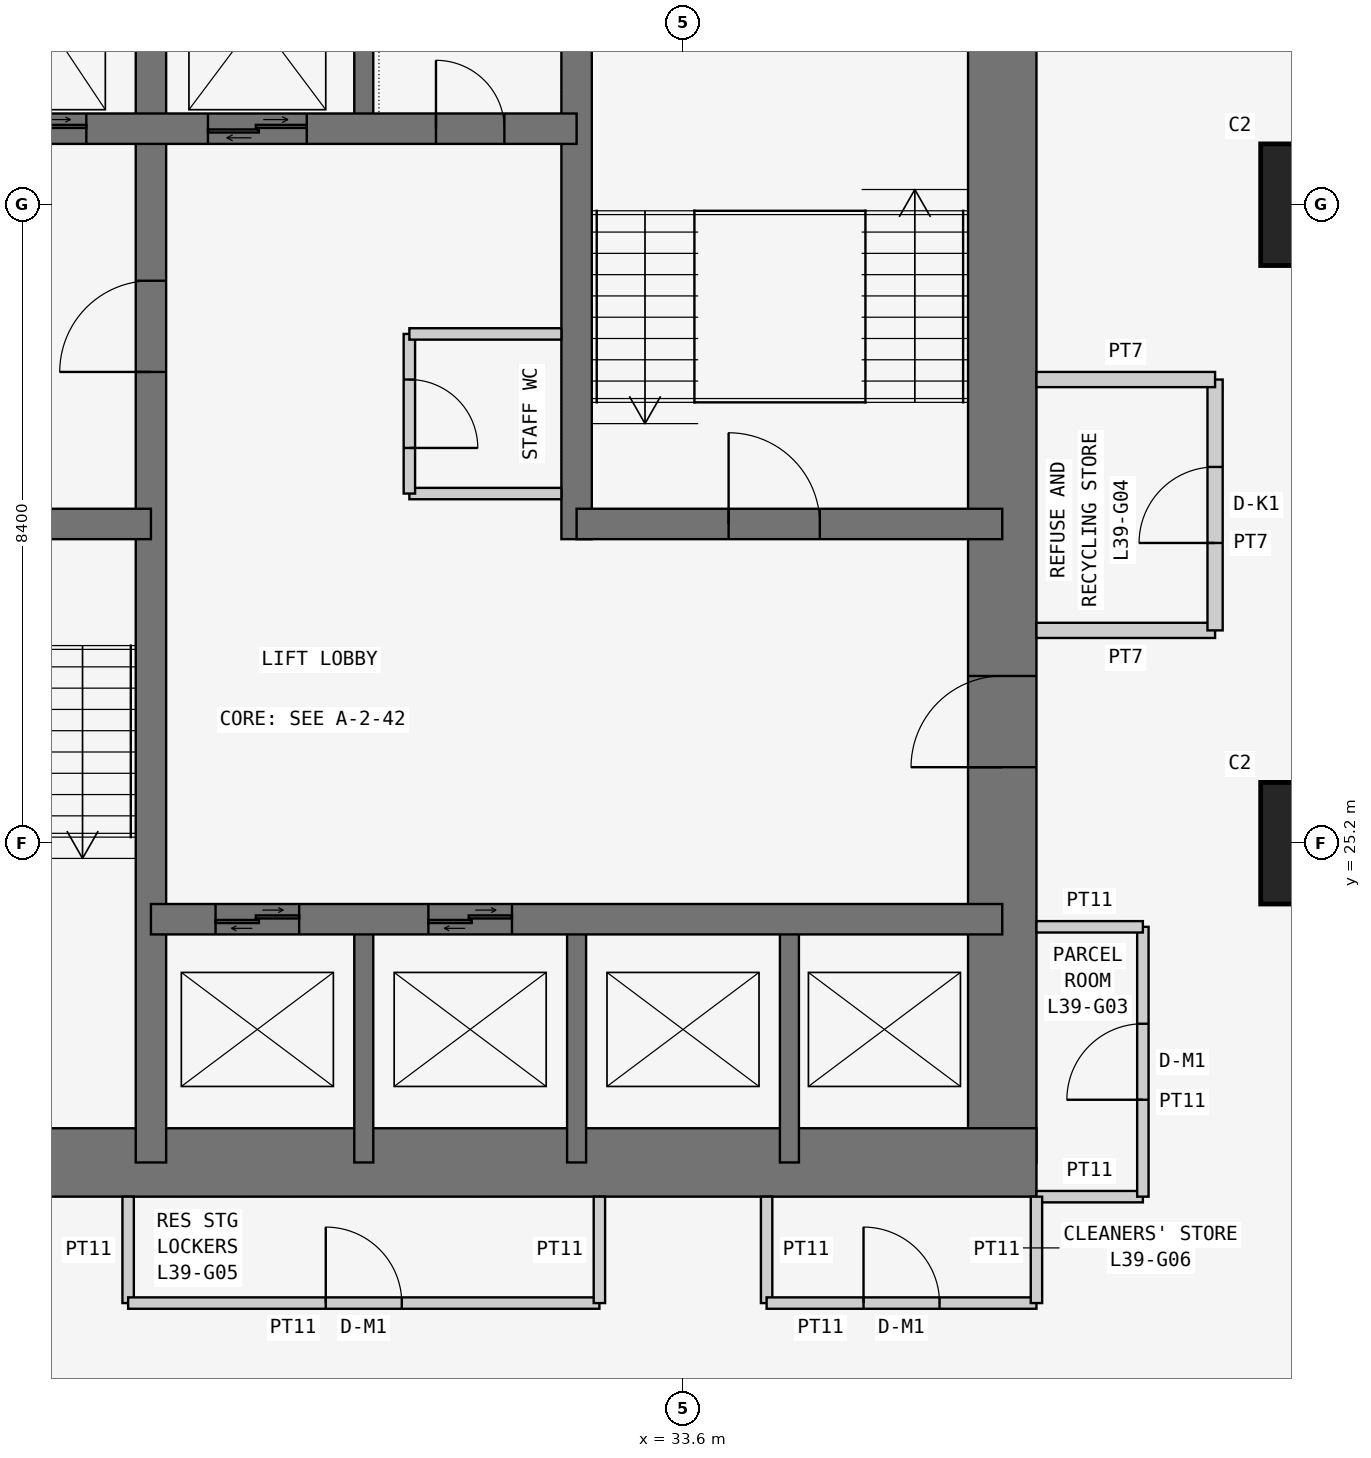
"""IFC4 building model, lengths in metres.
Left out: names, types, materials, properties, quantities, classifications, styles, units other than length and angle.
Written with IfcOpenShell. Run it as: python <this file> out.ifc"""

import sys

from ifc_helpers import new_model, si_unit, direction, frame, frame_2d, origin, origin_2d, place, context, subcontext, project, spatial, rectangle, extrude, element, fill, save


model = new_model("IFC4")
c1 = context("Model", 3, precision=1e-05, world=origin(), true_north=direction((0.0, 1.0)))
c2 = subcontext(c1, "Body", "Model", "MODEL_VIEW")
j1 = project(units=[si_unit("LENGTHUNIT", "METRE"), si_unit("PLANEANGLEUNIT", "RADIAN")], contexts=[c1])
p1 = place(None, origin())
s1 = spatial("IfcSite", under=j1, at=p1, CompositionType="ELEMENT")
p2 = place(p1, origin())
s2 = spatial("IfcBuilding", under=s1, at=p2, CompositionType="ELEMENT")
p3 = place(p2, frame((0.0, 0.0, 152.1)))
s3 = spatial("IfcBuildingStorey", under=s2, at=p3, CompositionType="ELEMENT", Elevation=152.1)
for number, where, z_axis, x_axis in (
    (1, (42.0, 25.2, 0.0), (0.0, 0.0, 1.0), (1.0, 0.0, 0.0)),
    (2, (42.0, 33.6, 0.0), (0.0, 0.0, 1.0), (1.0, 0.0, 0.0)),
):
    element("IfcColumn", number, at=place(p3, frame(where, z_axis=z_axis, x_axis=x_axis)), inside=s3, PredefinedType="COLUMN", context=c2, shape_type="SweptSolid", body=[
        extrude(rectangle(XDim=1.6, YDim=1.6, at=origin_2d()), origin(), (0.0, 0.0, 1.0), 3.6),
    ])
p4 = place(p3, frame((21.0, 21.0, 0.0), z_axis=(0.0, 0.0, 1.0), x_axis=(1.0, 0.0, 0.0)))
e3 = element("IfcWall", 3, at=p4, inside=s3, PredefinedType="SHEAR", context=c2, shape_type="SweptSolid", body=[
    extrude(rectangle(XDim=17.25, YDim=0.9, at=frame_2d((8.625, 0.0))), origin(), (0.0, 0.0, 1.0), 3.6),
])
p5 = place(p3, frame((37.8, 21.0, 0.0), z_axis=(0.0, 0.0, 1.0), x_axis=(0.0, 1.0, 0.0)))
e4 = element("IfcWall", 4, at=p5, inside=s3, PredefinedType="SHEAR", context=c2, shape_type="SweptSolid", body=[
    extrude(rectangle(XDim=17.25, YDim=0.9, at=frame_2d((8.625, 0.0))), origin(), (0.0, 0.0, 1.0), 3.6),
])
p6 = place(p5, frame((5.2, 0.0, 0.0)))
e5 = element("IfcOpeningElement", 5, at=p6, cuts=e4, PredefinedType="OPENING", context=c2, shape_type="SweptSolid", body=[
    extrude(rectangle(XDim=1.2, YDim=2.1, at=frame_2d((0.6, 1.05))), frame((0.0, 0.46, 0.0), z_axis=(0.0, -1.0, 0.0), x_axis=(1.0, 0.0, 0.0)), (0.0, 0.0, 1.0), 0.92),
])
p7 = place(p3, frame((26.6, 21.0, 0.0), z_axis=(0.0, 0.0, 1.0), x_axis=(0.0, 1.0, 0.0)))
e6 = element("IfcWall", 6, at=p7, inside=s3, PredefinedType="SHEAR", context=c2, shape_type="SweptSolid", body=[
    extrude(rectangle(XDim=16.8, YDim=0.4, at=frame_2d((8.4, 0.0))), origin(), (0.0, 0.0, 1.0), 3.6),
])
p8 = place(p7, frame((10.4, 0.0, 0.0)))
e7 = element("IfcOpeningElement", 7, at=p8, cuts=e6, PredefinedType="OPENING", context=c2, shape_type="SweptSolid", body=[
    extrude(rectangle(XDim=1.2, YDim=2.1, at=frame_2d((0.6, 1.05))), frame((0.0, 0.21, 0.0), z_axis=(0.0, -1.0, 0.0), x_axis=(1.0, 0.0, 0.0)), (0.0, 0.0, 1.0), 0.42),
])
p9 = place(p3, frame((21.0, 29.4, 0.0), z_axis=(0.0, 0.0, 1.0), x_axis=(1.0, 0.0, 0.0)))
e8 = element("IfcWall", 8, at=p9, inside=s3, PredefinedType="SHEAR", context=c2, shape_type="SweptSolid", body=[
    extrude(rectangle(XDim=5.6, YDim=0.4, at=frame_2d((2.8, 0.0))), origin(), (0.0, 0.0, 1.0), 3.6),
])
p10 = place(p9, frame((2.3, 0.0, 0.0)))
e9 = element("IfcOpeningElement", 9, at=p10, cuts=e8, PredefinedType="OPENING", context=c2, shape_type="SweptSolid", body=[
    extrude(rectangle(XDim=1.2, YDim=2.1, at=frame_2d((0.6, 1.05))), frame((0.0, 0.21, 0.0), z_axis=(0.0, -1.0, 0.0), x_axis=(1.0, 0.0, 0.0)), (0.0, 0.0, 1.0), 0.42),
])
p11 = place(p3, frame((21.0, 34.6, 0.0), z_axis=(0.0, 0.0, 1.0), x_axis=(1.0, 0.0, 0.0)))
e10 = element("IfcWall", 10, at=p11, inside=s3, PredefinedType="SHEAR", context=c2, shape_type="SweptSolid", body=[
    extrude(rectangle(XDim=11.2, YDim=0.4, at=frame_2d((5.6, 0.0))), origin(), (0.0, 0.0, 1.0), 3.6),
])
p12 = place(p11, frame((9.35, 0.0, 0.0)))
e11 = element("IfcOpeningElement", 11, at=p12, cuts=e10, PredefinedType="OPENING", context=c2, shape_type="SweptSolid", body=[
    extrude(rectangle(XDim=0.9, YDim=2.1, at=frame_2d((0.45, 1.05))), frame((0.0, 0.21, 0.0), z_axis=(0.0, -1.0, 0.0), x_axis=(1.0, 0.0, 0.0)), (0.0, 0.0, 1.0), 0.42),
])
p13 = place(p11, frame((1.0, 0.0, 0.0)))
e12 = element("IfcOpeningElement", 12, at=p13, cuts=e10, PredefinedType="OPENING", context=c2, shape_type="SweptSolid", body=[
    extrude(rectangle(XDim=1.1, YDim=2.1, at=frame_2d((0.55, 1.05))), frame((0.0, 0.21, 0.0), z_axis=(0.0, -1.0, 0.0), x_axis=(1.0, 0.0, 0.0)), (0.0, 0.0, 1.0), 0.42),
])
p14 = place(p11, frame((3.65, 0.0, 0.0)))
e13 = element("IfcOpeningElement", 13, at=p14, cuts=e10, PredefinedType="OPENING", context=c2, shape_type="SweptSolid", body=[
    extrude(rectangle(XDim=1.1, YDim=2.1, at=frame_2d((0.55, 1.05))), frame((0.0, 0.21, 0.0), z_axis=(0.0, -1.0, 0.0), x_axis=(1.0, 0.0, 0.0)), (0.0, 0.0, 1.0), 0.42),
])
p15 = place(p11, frame((6.35, 0.0, 0.0)))
e14 = element("IfcOpeningElement", 14, at=p15, cuts=e10, PredefinedType="OPENING", context=c2, shape_type="SweptSolid", body=[
    extrude(rectangle(XDim=1.3, YDim=2.1, at=frame_2d((0.65, 1.05))), frame((0.0, 0.21, 0.0), z_axis=(0.0, -1.0, 0.0), x_axis=(1.0, 0.0, 0.0)), (0.0, 0.0, 1.0), 0.42),
])
p16 = place(p3, frame((26.6, 24.2, 0.0), z_axis=(0.0, 0.0, 1.0), x_axis=(1.0, 0.0, 0.0)))
e15 = element("IfcWall", 15, at=p16, inside=s3, PredefinedType="SHEAR", context=c2, shape_type="SweptSolid", body=[
    extrude(rectangle(XDim=11.2, YDim=0.4, at=frame_2d((5.6, 0.0))), origin(), (0.0, 0.0, 1.0), 3.6),
])
p17 = place(p16, frame((0.85, 0.0, 0.0)))
e16 = element("IfcOpeningElement", 16, at=p17, cuts=e15, PredefinedType="OPENING", context=c2, shape_type="SweptSolid", body=[
    extrude(rectangle(XDim=1.1, YDim=2.1, at=frame_2d((0.55, 1.05))), frame((0.0, 0.21, 0.0), z_axis=(0.0, -1.0, 0.0), x_axis=(1.0, 0.0, 0.0)), (0.0, 0.0, 1.0), 0.42),
])
p18 = place(p16, frame((3.65, 0.0, 0.0)))
e17 = element("IfcOpeningElement", 17, at=p18, cuts=e15, PredefinedType="OPENING", context=c2, shape_type="SweptSolid", body=[
    extrude(rectangle(XDim=1.1, YDim=2.1, at=frame_2d((0.55, 1.05))), frame((0.0, 0.21, 0.0), z_axis=(0.0, -1.0, 0.0), x_axis=(1.0, 0.0, 0.0)), (0.0, 0.0, 1.0), 0.42),
])
p19 = place(p3, frame((32.2, 29.2, 0.0), z_axis=(0.0, 0.0, 1.0), x_axis=(0.0, 1.0, 0.0)))
e18 = element("IfcWall", 18, at=p19, inside=s3, PredefinedType="SHEAR", context=c2, shape_type="SweptSolid", body=[
    extrude(rectangle(XDim=8.6, YDim=0.4, at=frame_2d((4.3, 0.0))), origin(), (0.0, 0.0, 1.0), 3.6),
])
p20 = place(p3, frame((32.2, 29.4, 0.0), z_axis=(0.0, 0.0, 1.0), x_axis=(1.0, 0.0, 0.0)))
e19 = element("IfcWall", 19, at=p20, inside=s3, PredefinedType="SHEAR", context=c2, shape_type="SweptSolid", body=[
    extrude(rectangle(XDim=5.6, YDim=0.4, at=frame_2d((2.8, 0.0))), origin(), (0.0, 0.0, 1.0), 3.6),
])
p21 = place(p20, frame((2.0, 0.0, 0.0)))
e20 = element("IfcOpeningElement", 20, at=p21, cuts=e19, PredefinedType="OPENING", context=c2, shape_type="SweptSolid", body=[
    extrude(rectangle(XDim=1.2, YDim=2.1, at=frame_2d((0.6, 1.05))), frame((0.0, 0.21, 0.0), z_axis=(0.0, -1.0, 0.0), x_axis=(1.0, 0.0, 0.0)), (0.0, 0.0, 1.0), 0.42),
])
for number, where, z_axis, x_axis in (
    (21, (29.4, 21.0, 0.0), (0.0, 0.0, 1.0), (0.0, 1.0, 0.0)),
    (22, (32.2, 21.0, 0.0), (0.0, 0.0, 1.0), (0.0, 1.0, 0.0)),
    (23, (35.0, 21.0, 0.0), (0.0, 0.0, 1.0), (0.0, 1.0, 0.0)),
    (24, (29.4, 34.6, 0.0), (0.0, 0.0, 1.0), (0.0, 1.0, 0.0)),
):
    element("IfcWall", number, at=place(p3, frame(where, z_axis=z_axis, x_axis=x_axis)), inside=s3, PredefinedType="SHEAR", context=c2, shape_type="SweptSolid", body=[
        extrude(rectangle(XDim=3.2, YDim=0.25, at=frame_2d((1.6, 0.0))), origin(), (0.0, 0.0, 1.0), 3.6),
    ])
p22 = place(p3, frame((38.25, 20.55, 0.0), z_axis=(0.0, 0.0, 1.0), x_axis=(1.0, 0.0, 0.0)))
e25 = element("IfcWall", 25, at=p22, inside=s3, PredefinedType="PARTITIONING", context=c2, shape_type="SweptSolid", body=[
    extrude(rectangle(XDim=1.4, YDim=0.15, at=frame_2d((0.7, 0.0))), origin(), (0.0, 0.0, 1.0), 3.45),
])
p23 = place(p3, frame((39.65, 20.55, 0.0), z_axis=(0.0, 0.0, 1.0), x_axis=(0.0, 1.0, 0.0)))
e26 = element("IfcWall", 26, at=p23, inside=s3, PredefinedType="PARTITIONING", context=c2, shape_type="SweptSolid", body=[
    extrude(rectangle(XDim=3.55, YDim=0.15, at=frame_2d((1.775, 0.0))), origin(), (0.0, 0.0, 1.0), 3.45),
])
p24 = place(p23, frame((1.275, 0.0, 0.0)))
e27 = element("IfcOpeningElement", 27, at=p24, cuts=e26, PredefinedType="OPENING", context=c2, shape_type="SweptSolid", body=[
    extrude(rectangle(XDim=1.0, YDim=2.1, at=frame_2d((0.5, 1.05))), frame((0.0, 0.085, 0.0), z_axis=(0.0, -1.0, 0.0), x_axis=(1.0, 0.0, 0.0)), (0.0, 0.0, 1.0), 0.17),
])
p25 = place(p3, frame((39.65, 24.1, 0.0), z_axis=(0.0, 0.0, 1.0), x_axis=(-1.0, 0.0, 0.0)))
e28 = element("IfcWall", 28, at=p25, inside=s3, PredefinedType="PARTITIONING", context=c2, shape_type="SweptSolid", body=[
    extrude(rectangle(XDim=1.4, YDim=0.15, at=frame_2d((0.7, 0.0))), origin(), (0.0, 0.0, 1.0), 3.45),
])
p26 = place(p3, frame((38.25, 28.0, 0.0), z_axis=(0.0, 0.0, 1.0), x_axis=(1.0, 0.0, 0.0)))
e29 = element("IfcWall", 29, at=p26, inside=s3, PredefinedType="PARTITIONING", context=c2, shape_type="SweptSolid", body=[
    extrude(rectangle(XDim=2.35, YDim=0.2, at=frame_2d((1.175, 0.0))), origin(), (0.0, 0.0, 1.0), 3.45),
])
p27 = place(p3, frame((40.6, 28.0, 0.0), z_axis=(0.0, 0.0, 1.0), x_axis=(0.0, 1.0, 0.0)))
e30 = element("IfcWall", 30, at=p27, inside=s3, PredefinedType="PARTITIONING", context=c2, shape_type="SweptSolid", body=[
    extrude(rectangle(XDim=3.3, YDim=0.2, at=frame_2d((1.65, 0.0))), origin(), (0.0, 0.0, 1.0), 3.45),
])
p28 = place(p27, frame((1.15, 0.0, 0.0)))
e31 = element("IfcOpeningElement", 31, at=p28, cuts=e30, PredefinedType="OPENING", context=c2, shape_type="SweptSolid", body=[
    extrude(rectangle(XDim=1.0, YDim=2.1, at=frame_2d((0.5, 1.05))), frame((0.0, 0.11, 0.0), z_axis=(0.0, -1.0, 0.0), x_axis=(1.0, 0.0, 0.0)), (0.0, 0.0, 1.0), 0.22),
])
p29 = place(p3, frame((40.6, 31.3, 0.0), z_axis=(0.0, 0.0, 1.0), x_axis=(-1.0, 0.0, 0.0)))
e32 = element("IfcWall", 32, at=p29, inside=s3, PredefinedType="PARTITIONING", context=c2, shape_type="SweptSolid", body=[
    extrude(rectangle(XDim=2.35, YDim=0.2, at=frame_2d((1.175, 0.0))), origin(), (0.0, 0.0, 1.0), 3.45),
])
p30 = place(p3, frame((26.3, 20.55, 0.0), z_axis=(0.0, 0.0, 1.0), x_axis=(0.0, -1.0, 0.0)))
e33 = element("IfcWall", 33, at=p30, inside=s3, PredefinedType="PARTITIONING", context=c2, shape_type="SweptSolid", body=[
    extrude(rectangle(XDim=1.4, YDim=0.15, at=frame_2d((0.7, 0.0))), origin(), (0.0, 0.0, 1.0), 3.45),
])
p31 = place(p3, frame((26.3, 19.15, 0.0), z_axis=(0.0, 0.0, 1.0), x_axis=(1.0, 0.0, 0.0)))
e34 = element("IfcWall", 34, at=p31, inside=s3, PredefinedType="PARTITIONING", context=c2, shape_type="SweptSolid", body=[
    extrude(rectangle(XDim=6.2, YDim=0.15, at=frame_2d((3.1, 0.0))), origin(), (0.0, 0.0, 1.0), 3.45),
])
p32 = place(p31, frame((2.6, 0.0, 0.0)))
e35 = element("IfcOpeningElement", 35, at=p32, cuts=e34, PredefinedType="OPENING", context=c2, shape_type="SweptSolid", body=[
    extrude(rectangle(XDim=1.0, YDim=2.1, at=frame_2d((0.5, 1.05))), frame((0.0, 0.085, 0.0), z_axis=(0.0, -1.0, 0.0), x_axis=(1.0, 0.0, 0.0)), (0.0, 0.0, 1.0), 0.17),
])
for number, where, z_axis, x_axis in (
    (36, (32.5, 19.15, 0.0), (0.0, 0.0, 1.0), (0.0, 1.0, 0.0)),
    (37, (34.7, 20.55, 0.0), (0.0, 0.0, 1.0), (0.0, -1.0, 0.0)),
):
    element("IfcWall", number, at=place(p3, frame(where, z_axis=z_axis, x_axis=x_axis)), inside=s3, PredefinedType="PARTITIONING", context=c2, shape_type="SweptSolid", body=[
        extrude(rectangle(XDim=1.4, YDim=0.15, at=frame_2d((0.7, 0.0))), origin(), (0.0, 0.0, 1.0), 3.45),
    ])
p33 = place(p3, frame((34.7, 19.15, 0.0), z_axis=(0.0, 0.0, 1.0), x_axis=(1.0, 0.0, 0.0)))
e38 = element("IfcWall", 38, at=p33, inside=s3, PredefinedType="PARTITIONING", context=c2, shape_type="SweptSolid", body=[
    extrude(rectangle(XDim=3.55, YDim=0.15, at=frame_2d((1.775, 0.0))), origin(), (0.0, 0.0, 1.0), 3.45),
])
p34 = place(p33, frame((1.275, 0.0, 0.0)))
e39 = element("IfcOpeningElement", 39, at=p34, cuts=e38, PredefinedType="OPENING", context=c2, shape_type="SweptSolid", body=[
    extrude(rectangle(XDim=1.0, YDim=2.1, at=frame_2d((0.5, 1.05))), frame((0.0, 0.085, 0.0), z_axis=(0.0, -1.0, 0.0), x_axis=(1.0, 0.0, 0.0)), (0.0, 0.0, 1.0), 0.17),
])
p35 = place(p3, frame((38.25, 19.15, 0.0), z_axis=(0.0, 0.0, 1.0), x_axis=(0.0, 1.0, 0.0)))
e40 = element("IfcWall", 40, at=p35, inside=s3, PredefinedType="PARTITIONING", context=c2, shape_type="SweptSolid", body=[
    extrude(rectangle(XDim=1.4, YDim=0.15, at=frame_2d((0.7, 0.0))), origin(), (0.0, 0.0, 1.0), 3.45),
])
p36 = place(p3, frame((32.0, 29.8, 0.0), z_axis=(0.0, 0.0, 1.0), x_axis=(-1.0, 0.0, 0.0)))
e41 = element("IfcWall", 41, at=p36, inside=s3, PredefinedType="PARTITIONING", context=c2, shape_type="SweptSolid", body=[
    extrude(rectangle(XDim=2.0, YDim=0.15, at=frame_2d((1.0, 0.0))), origin(), (0.0, 0.0, 1.0), 3.45),
])
p37 = place(p3, frame((30.0, 29.8, 0.0), z_axis=(0.0, 0.0, 1.0), x_axis=(0.0, 1.0, 0.0)))
e42 = element("IfcWall", 42, at=p37, inside=s3, PredefinedType="PARTITIONING", context=c2, shape_type="SweptSolid", body=[
    extrude(rectangle(XDim=2.1, YDim=0.15, at=frame_2d((1.05, 0.0))), origin(), (0.0, 0.0, 1.0), 3.45),
])
p38 = place(p37, frame((0.6, 0.0, 0.0)))
e43 = element("IfcOpeningElement", 43, at=p38, cuts=e42, PredefinedType="OPENING", context=c2, shape_type="SweptSolid", body=[
    extrude(rectangle(XDim=0.9, YDim=2.1, at=frame_2d((0.45, 1.05))), frame((0.0, 0.085, 0.0), z_axis=(0.0, -1.0, 0.0), x_axis=(1.0, 0.0, 0.0)), (0.0, 0.0, 1.0), 0.17),
])
p39 = place(p3, frame((30.0, 31.9, 0.0), z_axis=(0.0, 0.0, 1.0), x_axis=(1.0, 0.0, 0.0)))
e44 = element("IfcWall", 44, at=p39, inside=s3, PredefinedType="PARTITIONING", context=c2, shape_type="SweptSolid", body=[
    extrude(rectangle(XDim=2.0, YDim=0.15, at=frame_2d((1.0, 0.0))), origin(), (0.0, 0.0, 1.0), 3.45),
])
p40 = place(p24, origin())
e45 = element("IfcDoor", 45, at=p40, inside=s3, OperationType="SINGLE_SWING_LEFT", PredefinedType="DOOR", context=c2, shape_type="SweptSolid", body=[
    extrude(rectangle(XDim=1.0, YDim=2.1, at=frame_2d((0.5, 1.05))), frame((0.0, 0.025, 0.0), z_axis=(0.0, -1.0, 0.0), x_axis=(1.0, 0.0, 0.0)), (0.0, 0.0, 1.0), 0.05),
])
fill(e27, e45)
p41 = place(p28, origin())
e46 = element("IfcDoor", 46, at=p41, inside=s3, OperationType="SINGLE_SWING_LEFT", PredefinedType="DOOR", context=c2, shape_type="SweptSolid", body=[
    extrude(rectangle(XDim=1.0, YDim=2.1, at=frame_2d((0.5, 1.05))), frame((0.0, 0.025, 0.0), z_axis=(0.0, -1.0, 0.0), x_axis=(1.0, 0.0, 0.0)), (0.0, 0.0, 1.0), 0.05),
])
fill(e31, e46)
p42 = place(p32, origin())
e47 = element("IfcDoor", 47, at=p42, inside=s3, OperationType="SINGLE_SWING_LEFT", PredefinedType="DOOR", context=c2, shape_type="SweptSolid", body=[
    extrude(rectangle(XDim=1.0, YDim=2.1, at=frame_2d((0.5, 1.05))), frame((0.0, 0.025, 0.0), z_axis=(0.0, -1.0, 0.0), x_axis=(1.0, 0.0, 0.0)), (0.0, 0.0, 1.0), 0.05),
])
fill(e35, e47)
p43 = place(p34, origin())
e48 = element("IfcDoor", 48, at=p43, inside=s3, OperationType="SINGLE_SWING_LEFT", PredefinedType="DOOR", context=c2, shape_type="SweptSolid", body=[
    extrude(rectangle(XDim=1.0, YDim=2.1, at=frame_2d((0.5, 1.05))), frame((0.0, 0.025, 0.0), z_axis=(0.0, -1.0, 0.0), x_axis=(1.0, 0.0, 0.0)), (0.0, 0.0, 1.0), 0.05),
])
fill(e39, e48)
p44 = place(p8, origin())
e49 = element("IfcDoor", 49, at=p44, inside=s3, OperationType="SINGLE_SWING_LEFT", PredefinedType="DOOR", context=c2, shape_type="SweptSolid", body=[
    extrude(rectangle(XDim=1.2, YDim=2.1, at=frame_2d((0.6, 1.05))), frame((0.0, 0.025, 0.0), z_axis=(0.0, -1.0, 0.0), x_axis=(1.0, 0.0, 0.0)), (0.0, 0.0, 1.0), 0.05),
])
fill(e7, e49)
p45 = place(p6, origin())
e50 = element("IfcDoor", 50, at=p45, inside=s3, OperationType="SINGLE_SWING_LEFT", PredefinedType="DOOR", context=c2, shape_type="SweptSolid", body=[
    extrude(rectangle(XDim=1.2, YDim=2.1, at=frame_2d((0.6, 1.05))), frame((0.0, 0.025, 0.0), z_axis=(0.0, -1.0, 0.0), x_axis=(1.0, 0.0, 0.0)), (0.0, 0.0, 1.0), 0.05),
])
fill(e5, e50)
p46 = place(p21, origin())
e51 = element("IfcDoor", 51, at=p46, inside=s3, OperationType="SINGLE_SWING_LEFT", PredefinedType="DOOR", context=c2, shape_type="SweptSolid", body=[
    extrude(rectangle(XDim=1.2, YDim=2.1, at=frame_2d((0.6, 1.05))), frame((0.0, 0.025, 0.0), z_axis=(0.0, -1.0, 0.0), x_axis=(1.0, 0.0, 0.0)), (0.0, 0.0, 1.0), 0.05),
])
fill(e20, e51)
p47 = place(p12, origin())
e52 = element("IfcDoor", 52, at=p47, inside=s3, OperationType="SINGLE_SWING_LEFT", PredefinedType="DOOR", context=c2, shape_type="SweptSolid", body=[
    extrude(rectangle(XDim=0.9, YDim=2.1, at=frame_2d((0.45, 1.05))), frame((0.0, 0.025, 0.0), z_axis=(0.0, -1.0, 0.0), x_axis=(1.0, 0.0, 0.0)), (0.0, 0.0, 1.0), 0.05),
])
fill(e11, e52)
p48 = place(p38, frame((0.9, 0.0, 0.0), z_axis=(0.0, 0.0, 1.0), x_axis=(-1.0, 0.0, 0.0)))
e53 = element("IfcDoor", 53, at=p48, inside=s3, OperationType="SINGLE_SWING_RIGHT", PredefinedType="DOOR", context=c2, shape_type="SweptSolid", body=[
    extrude(rectangle(XDim=0.9, YDim=2.1, at=frame_2d((0.45, 1.05))), frame((0.0, 0.025, 0.0), z_axis=(0.0, -1.0, 0.0), x_axis=(1.0, 0.0, 0.0)), (0.0, 0.0, 1.0), 0.05),
])
fill(e43, e53)
p49 = place(p17, origin())
e54 = element("IfcDoor", 54, at=p49, inside=s3, OperationType="DOUBLE_DOOR_SLIDING", PredefinedType="DOOR", context=c2, shape_type="SweptSolid", body=[
    extrude(rectangle(XDim=1.1, YDim=2.1, at=frame_2d((0.55, 1.05))), frame((0.0, 0.025, 0.0), z_axis=(0.0, -1.0, 0.0), x_axis=(1.0, 0.0, 0.0)), (0.0, 0.0, 1.0), 0.05),
])
fill(e16, e54)
p50 = place(p18, origin())
e55 = element("IfcDoor", 55, at=p50, inside=s3, OperationType="DOUBLE_DOOR_SLIDING", PredefinedType="DOOR", context=c2, shape_type="SweptSolid", body=[
    extrude(rectangle(XDim=1.1, YDim=2.1, at=frame_2d((0.55, 1.05))), frame((0.0, 0.025, 0.0), z_axis=(0.0, -1.0, 0.0), x_axis=(1.0, 0.0, 0.0)), (0.0, 0.0, 1.0), 0.05),
])
fill(e17, e55)
p51 = place(p14, origin())
e56 = element("IfcDoor", 56, at=p51, inside=s3, OperationType="DOUBLE_DOOR_SLIDING", PredefinedType="DOOR", context=c2, shape_type="SweptSolid", body=[
    extrude(rectangle(XDim=1.1, YDim=2.1, at=frame_2d((0.55, 1.05))), frame((0.0, 0.025, 0.0), z_axis=(0.0, -1.0, 0.0), x_axis=(1.0, 0.0, 0.0)), (0.0, 0.0, 1.0), 0.05),
])
fill(e13, e56)
p52 = place(p15, origin())
e57 = element("IfcDoor", 57, at=p52, inside=s3, OperationType="DOUBLE_DOOR_SLIDING", PredefinedType="DOOR", context=c2, shape_type="SweptSolid", body=[
    extrude(rectangle(XDim=1.3, YDim=2.1, at=frame_2d((0.65, 1.05))), frame((0.0, 0.025, 0.0), z_axis=(0.0, -1.0, 0.0), x_axis=(1.0, 0.0, 0.0)), (0.0, 0.0, 1.0), 0.05),
])
fill(e14, e57)
save(model, sys.argv[1])
